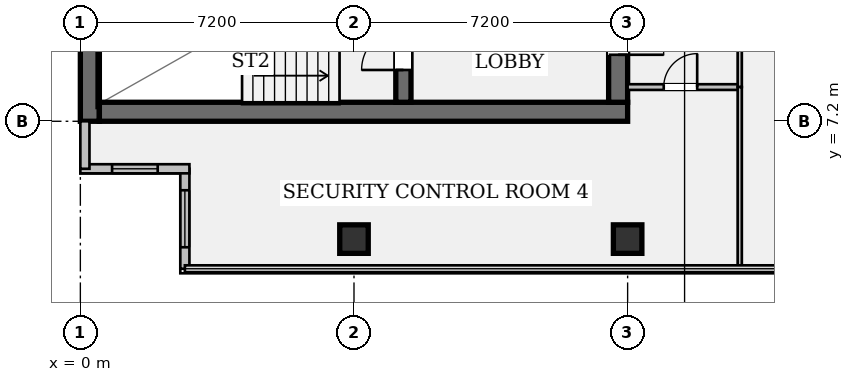
"""IFC4 building model, lengths in metres.
Left out: names, types, materials, properties, quantities, classifications, styles, units other than length and angle.
Written with IfcOpenShell. Run it as: python <this file> out.ifc"""

import sys

from ifc_helpers import new_model, si_unit, direction, frame, frame_2d, origin, origin_2d, place, context, subcontext, project, spatial, rectangle, hollow_rectangle, extrude, element, fill, save


model = new_model("IFC4")
c1 = context("Model", 3, precision=1e-05, world=origin(), true_north=direction((0.0, 1.0)))
c2 = subcontext(c1, "Body", "Model", "MODEL_VIEW")
j1 = project(units=[si_unit("LENGTHUNIT", "METRE"), si_unit("PLANEANGLEUNIT", "RADIAN")], contexts=[c1])
p1 = place(None, origin())
s1 = spatial("IfcSite", under=j1, at=p1, CompositionType="ELEMENT")
p2 = place(p1, origin())
s2 = spatial("IfcBuilding", under=s1, at=p2, CompositionType="ELEMENT")
p3 = place(p2, frame((0.0, 0.0, 211.75)))
s3 = spatial("IfcBuildingStorey", under=s2, at=p3, CompositionType="ELEMENT", Elevation=211.75)
p4 = place(p3, frame((0.25, 7.2, 0.0), z_axis=(0.0, 0.0, 1.0), x_axis=(0.0, 1.0, 0.0)))
e1 = element("IfcWall", 1, at=p4, inside=s3, PredefinedType="SHEAR", context=c2, shape_type="SweptSolid", body=[
    extrude(rectangle(XDim=28.8, YDim=0.5, at=frame_2d((14.4, 0.0))), origin(), (0.0, 0.0, 1.0), 3.24),
])
p5 = place(p3, frame((0.5, 7.45, 0.0), z_axis=(0.0, 0.0, 1.0), x_axis=(1.0, 0.0, 0.0)))
e2 = element("IfcWall", 2, at=p5, inside=s3, PredefinedType="SHEAR", context=c2, shape_type="SweptSolid", body=[
    extrude(rectangle(XDim=13.9, YDim=0.5, at=frame_2d((6.95, 0.0))), origin(), (0.0, 0.0, 1.0), 3.24),
])
p6 = place(p3, frame((14.15, 35.5, 0.0), z_axis=(0.0, 0.0, 1.0), x_axis=(0.0, -1.0, 0.0)))
e3 = element("IfcWall", 3, at=p6, inside=s3, PredefinedType="SHEAR", context=c2, shape_type="SweptSolid", body=[
    extrude(rectangle(XDim=27.8, YDim=0.5, at=frame_2d((13.9, 0.0))), origin(), (0.0, 0.0, 1.0), 3.24),
])
p7 = place(p6, frame((1.4, 0.0, 0.0)))
e4 = element("IfcOpeningElement", 4, at=p7, cuts=e3, PredefinedType="OPENING", context=c2, shape_type="SweptSolid", body=[
    extrude(rectangle(XDim=1.2, YDim=2.15, at=frame_2d((0.6, 1.075))), frame((0.0, 0.262, 0.0), z_axis=(0.0, -1.0, 0.0), x_axis=(1.0, 0.0, 0.0)), (0.0, 0.0, 1.0), 0.524),
])
p8 = place(p6, frame((25.35, 0.0, 0.0)))
e5 = element("IfcOpeningElement", 5, at=p8, cuts=e3, PredefinedType="OPENING", context=c2, shape_type="SweptSolid", body=[
    extrude(rectangle(XDim=1.2, YDim=2.15, at=frame_2d((0.6, 1.075))), frame((0.0, 0.262, 0.0), z_axis=(0.0, -1.0, 0.0), x_axis=(1.0, 0.0, 0.0)), (0.0, 0.0, 1.0), 0.524),
])
p9 = place(p6, frame((14.7, 0.0, 0.0)))
e6 = element("IfcOpeningElement", 6, at=p9, cuts=e3, PredefinedType="OPENING", context=c2, shape_type="SweptSolid", body=[
    extrude(rectangle(XDim=1.6, YDim=2.2, at=frame_2d((0.8, 1.1))), frame((0.0, 0.262, 0.0), z_axis=(0.0, -1.0, 0.0), x_axis=(1.0, 0.0, 0.0)), (0.0, 0.0, 1.0), 0.524),
])
p10 = place(p3, frame((8.5, 7.7, 0.0), z_axis=(0.0, 0.0, 1.0), x_axis=(0.0, 1.0, 0.0)))
e7 = element("IfcWall", 7, at=p10, inside=s3, PredefinedType="SHEAR", context=c2, shape_type="SweptSolid", body=[
    extrude(rectangle(XDim=3.78, YDim=0.4, at=frame_2d((1.89, 0.0))), origin(), (0.0, 0.0, 1.0), 3.24),
])
p11 = place(p10, frame((0.85, 0.0, 0.0)))
e8 = element("IfcOpeningElement", 8, at=p11, cuts=e7, PredefinedType="OPENING", context=c2, shape_type="SweptSolid", body=[
    extrude(rectangle(XDim=1.1, YDim=2.15, at=frame_2d((0.55, 1.075))), frame((0.0, 0.212, 0.0), z_axis=(0.0, -1.0, 0.0), x_axis=(1.0, 0.0, 0.0)), (0.0, 0.0, 1.0), 0.424),
])
for number, where, z_axis, x_axis in (
    (9, (7.2, 4.1, 0.0), (0.0, 0.0, 1.0), (1.0, 0.0, 0.0)),
    (10, (14.4, 4.1, 0.0), (0.0, 0.0, 1.0), (1.0, 0.0, 0.0)),
):
    element("IfcColumn", number, at=place(p3, frame(where, z_axis=z_axis, x_axis=x_axis)), inside=s3, PredefinedType="COLUMN", context=c2, shape_type="SweptSolid", body=[
        extrude(hollow_rectangle(XDim=0.75, YDim=0.75, WallThickness=0.045, at=origin_2d()), origin(), (0.0, 0.0, 1.0), 3.24),
    ])
p12 = place(p3, frame((2.75, 3.32, 0.0), z_axis=(0.0, 0.0, 1.0), x_axis=(0.0, 1.0, 0.0)))
e11 = element("IfcWall", 11, at=p12, inside=s3, PredefinedType="STANDARD", context=c2, shape_type="SweptSolid", body=[
    extrude(rectangle(XDim=2.63, YDim=0.24, at=frame_2d((1.315, 0.0))), origin(), (0.0, 0.0, 1.0), 3.24),
])
p13 = place(p12, frame((0.565, 0.0, 0.95)))
e12 = element("IfcOpeningElement", 12, at=p13, cuts=e11, PredefinedType="OPENING", context=c2, shape_type="SweptSolid", body=[
    extrude(rectangle(XDim=1.5, YDim=1.8, at=frame_2d((0.75, 0.9))), frame((0.0, 0.132, 0.0), z_axis=(0.0, -1.0, 0.0), x_axis=(1.0, 0.0, 0.0)), (0.0, 0.0, 1.0), 0.264),
])
p14 = place(p3, frame((2.87, 5.95, 0.0), z_axis=(0.0, 0.0, 1.0), x_axis=(-1.0, 0.0, 0.0)))
e13 = element("IfcWall", 13, at=p14, inside=s3, PredefinedType="STANDARD", context=c2, shape_type="SweptSolid", body=[
    extrude(rectangle(XDim=2.87, YDim=0.24, at=frame_2d((1.435, 0.0))), origin(), (0.0, 0.0, 1.0), 3.24),
])
p15 = place(p14, frame((0.835, 0.0, 0.95)))
e14 = element("IfcOpeningElement", 14, at=p15, cuts=e13, PredefinedType="OPENING", context=c2, shape_type="SweptSolid", body=[
    extrude(rectangle(XDim=1.2, YDim=1.8, at=frame_2d((0.6, 0.9))), frame((0.0, 0.132, 0.0), z_axis=(0.0, -1.0, 0.0), x_axis=(1.0, 0.0, 0.0)), (0.0, 0.0, 1.0), 0.264),
])
p16 = place(p3, frame((0.12, 5.95, 0.0), z_axis=(0.0, 0.0, 1.0), x_axis=(0.0, 1.0, 0.0)))
e15 = element("IfcWall", 15, at=p16, inside=s3, PredefinedType="STANDARD", context=c2, shape_type="SweptSolid", body=[
    extrude(rectangle(XDim=1.25, YDim=0.24, at=frame_2d((0.625, 0.0))), origin(), (0.0, 0.0, 1.0), 3.24),
])
p17 = place(p3, frame((14.4, 8.1, 0.0), z_axis=(0.0, 0.0, 1.0), x_axis=(1.0, 0.0, 0.0)))
e16 = element("IfcWall", 16, at=p17, inside=s3, PredefinedType="PARTITIONING", context=c2, shape_type="SweptSolid", body=[
    extrude(rectangle(XDim=2.95, YDim=0.15, at=frame_2d((1.475, 0.0))), origin(), (0.0, 0.0, 1.0), 2.808),
])
p18 = place(p17, frame((0.95, 0.0, 0.0)))
e17 = element("IfcOpeningElement", 17, at=p18, cuts=e16, PredefinedType="OPENING", context=c2, shape_type="SweptSolid", body=[
    extrude(rectangle(XDim=0.88, YDim=2.15, at=frame_2d((0.44, 1.075))), frame((0.0, 0.087, 0.0), z_axis=(0.0, -1.0, 0.0), x_axis=(1.0, 0.0, 0.0)), (0.0, 0.0, 1.0), 0.174),
])
p19 = place(p3, frame((17.35, 8.1, 0.0), z_axis=(0.0, 0.0, 1.0), x_axis=(0.0, 1.0, 0.0)))
e18 = element("IfcWall", 18, at=p19, inside=s3, PredefinedType="PARTITIONING", context=c2, shape_type="SweptSolid", body=[
    extrude(rectangle(XDim=7.6, YDim=0.11, at=frame_2d((3.8, 0.0))), origin(), (0.0, 0.0, 1.0), 2.613),
])
p20 = place(p3, frame((17.35, 3.32, 0.0), z_axis=(0.0, 0.0, 1.0), x_axis=(0.0, 1.0, 0.0)))
e19 = element("IfcWall", 19, at=p20, inside=s3, PredefinedType="PARTITIONING", context=c2, shape_type="SweptSolid", body=[
    extrude(rectangle(XDim=4.78, YDim=0.11, at=frame_2d((2.39, 0.0))), origin(), (0.0, 0.0, 1.0), 2.613),
])
p21 = place(p13, origin())
e20 = element("IfcWindow", 20, at=p21, inside=s3, PartitioningType="SINGLE_PANEL", PredefinedType="WINDOW", context=c2, shape_type="SweptSolid", body=[
    extrude(rectangle(XDim=1.5, YDim=1.8, at=frame_2d((0.75, 0.9))), frame((0.0, 0.03, 0.0), z_axis=(0.0, -1.0, 0.0), x_axis=(1.0, 0.0, 0.0)), (0.0, 0.0, 1.0), 0.06),
])
fill(e12, e20)
p22 = place(p15, origin())
e21 = element("IfcWindow", 21, at=p22, inside=s3, PartitioningType="SINGLE_PANEL", PredefinedType="WINDOW", context=c2, shape_type="SweptSolid", body=[
    extrude(rectangle(XDim=1.2, YDim=1.8, at=frame_2d((0.6, 0.9))), frame((0.0, 0.03, 0.0), z_axis=(0.0, -1.0, 0.0), x_axis=(1.0, 0.0, 0.0)), (0.0, 0.0, 1.0), 0.06),
])
fill(e14, e21)
p23 = place(p11, origin())
e22 = element("IfcDoor", 22, at=p23, inside=s3, OperationType="SINGLE_SWING_LEFT", PredefinedType="DOOR", context=c2, shape_type="SweptSolid", body=[
    extrude(rectangle(XDim=1.1, YDim=2.15, at=frame_2d((0.55, 1.075))), frame((0.0, 0.025, 0.0), z_axis=(0.0, -1.0, 0.0), x_axis=(1.0, 0.0, 0.0)), (0.0, 0.0, 1.0), 0.05),
])
fill(e8, e22)
p24 = place(p8, origin())
e23 = element("IfcDoor", 23, at=p24, inside=s3, OperationType="SINGLE_SWING_RIGHT", PredefinedType="DOOR", context=c2, shape_type="SweptSolid", body=[
    extrude(rectangle(XDim=1.2, YDim=2.15, at=frame_2d((0.6, 1.075))), frame((0.0, 0.025, 0.0), z_axis=(0.0, -1.0, 0.0), x_axis=(1.0, 0.0, 0.0)), (0.0, 0.0, 1.0), 0.05),
])
fill(e5, e23)
p25 = place(p18, origin())
e24 = element("IfcDoor", 24, at=p25, inside=s3, OperationType="SINGLE_SWING_RIGHT", PredefinedType="DOOR", context=c2, shape_type="SweptSolid", body=[
    extrude(rectangle(XDim=0.88, YDim=2.15, at=frame_2d((0.44, 1.075))), frame((0.0, 0.025, 0.0), z_axis=(0.0, -1.0, 0.0), x_axis=(1.0, 0.0, 0.0)), (0.0, 0.0, 1.0), 0.05),
])
fill(e17, e24)
save(model, sys.argv[1])
